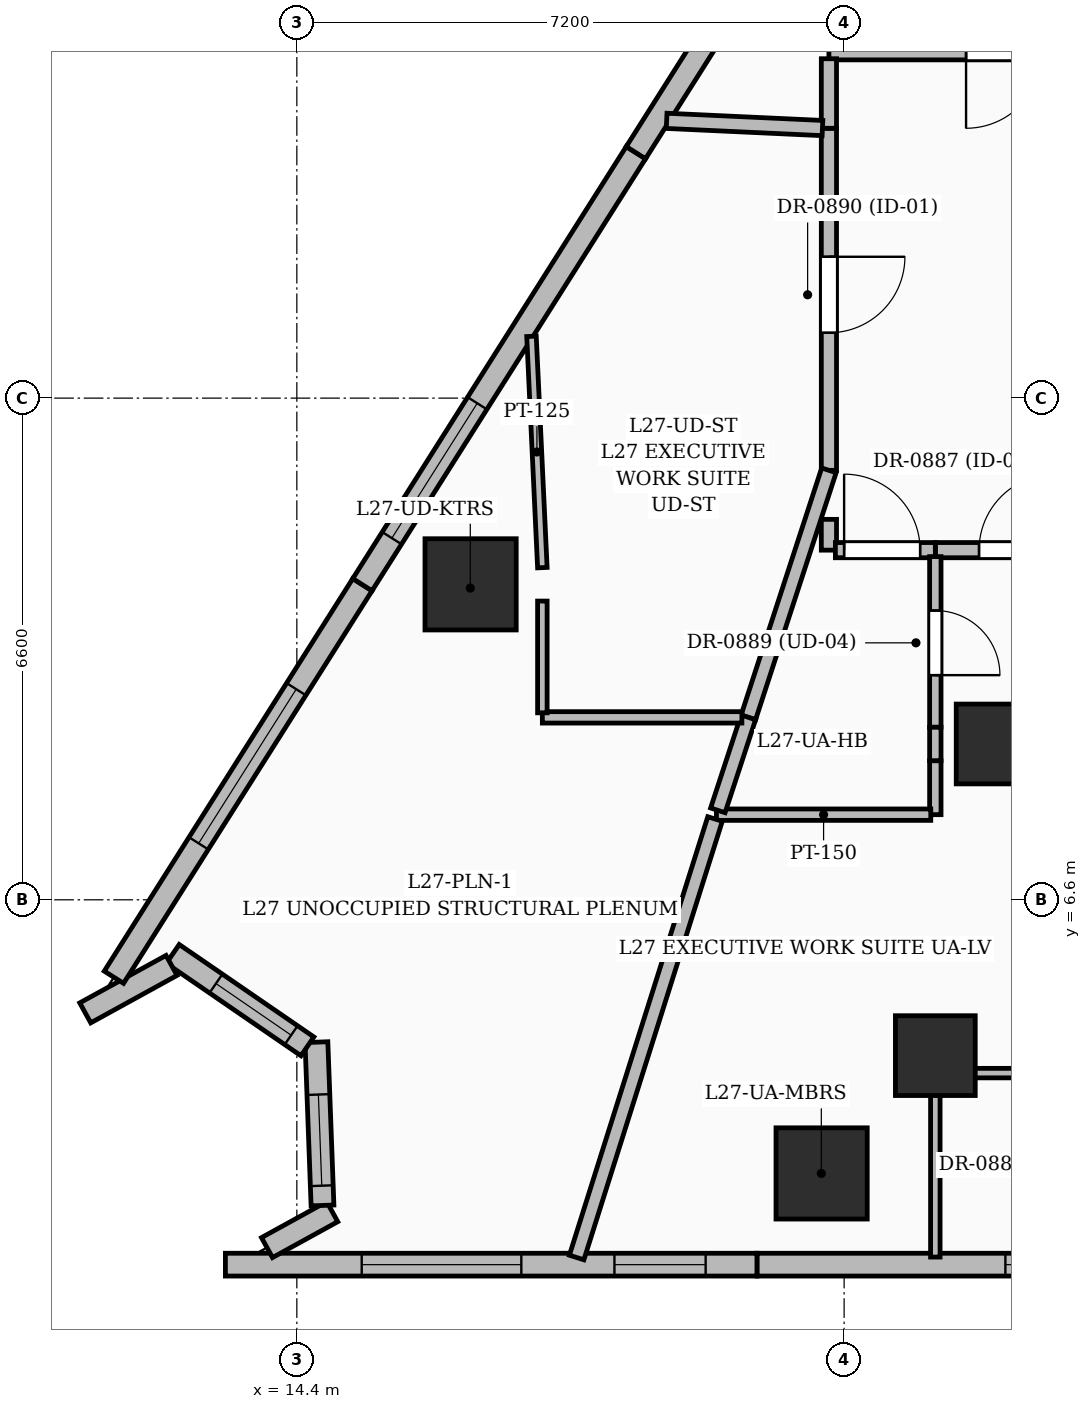
"""IFC4 building model, lengths in metres.
Left out: names, types, materials, properties, quantities, classifications, styles, units other than length and angle.
Written with IfcOpenShell. Run it as: python <this file> out.ifc"""

import sys

from ifc_helpers import new_model, si_unit, direction, frame, frame_2d, origin, origin_2d, place, context, subcontext, project, spatial, rectangle, extrude, element, fill, save


model = new_model("IFC4")
c1 = context("Model", 3, precision=1e-05, world=origin(), true_north=direction((0.0, 1.0)))
c2 = subcontext(c1, "Body", "Model", "MODEL_VIEW")
j1 = project(units=[si_unit("LENGTHUNIT", "METRE"), si_unit("PLANEANGLEUNIT", "RADIAN")], contexts=[c1])
p1 = place(None, origin())
s1 = spatial("IfcSite", under=j1, at=p1, CompositionType="ELEMENT")
p2 = place(p1, origin())
s2 = spatial("IfcBuilding", under=s1, at=p2, CompositionType="ELEMENT")
p3 = place(p2, frame((0.0, 0.0, 110.4)))
s3 = spatial("IfcBuildingStorey", under=s2, at=p3, CompositionType="ELEMENT", Elevation=110.4)
for number, where, z_axis, x_axis in (
    (1, (22.8, 4.55, 0.0), (0.0, 0.0, 1.0), (1.0, 0.0, 0.0)),
    (2, (23.6, 8.65, 0.0), (0.0, 0.0, 1.0), (1.0, 0.0, 0.0)),
):
    element("IfcColumn", number, at=place(p3, frame(where, z_axis=z_axis, x_axis=x_axis)), inside=s3, PredefinedType="COLUMN", context=c2, shape_type="SweptSolid", body=[
        extrude(rectangle(XDim=1.05, YDim=1.05, at=origin_2d()), origin(), (0.0, 0.0, 1.0), 3.6),
    ])
for number, where, z_axis, x_axis in (
    (3, (21.304, 3.0, 0.0), (0.0, 0.0, 1.0), (1.0, 0.0, 0.0)),
    (4, (16.686, 10.75, 0.0), (0.0, 0.0, 1.0), (1.0, 0.0, 0.0)),
):
    element("IfcColumn", number, at=place(p3, frame(where, z_axis=z_axis, x_axis=x_axis)), inside=s3, PredefinedType="COLUMN", context=c2, shape_type="SweptSolid", body=[
        extrude(rectangle(XDim=1.2, YDim=1.2, at=origin_2d()), origin(), (0.0, 0.0, 1.0), 3.6),
    ])
p4 = place(p3, frame((27.447, 1.8, 0.0), z_axis=(0.0, 0.0, 1.0), x_axis=(-1.0, 0.0, 0.0)))
e5 = element("IfcWall", 5, at=p4, inside=s3, PredefinedType="SOLIDWALL", context=c2, shape_type="SweptSolid", body=[
    extrude(rectangle(XDim=6.993, YDim=0.3, at=frame_2d((3.497, 0.0))), origin(), (0.0, 0.0, 1.0), 3.35),
])
p5 = place(p4, frame((1.325, 0.0, 0.6)))
e6 = element("IfcOpeningElement", 6, at=p5, cuts=e5, PredefinedType="OPENING", context=c2, shape_type="SweptSolid", body=[
    extrude(rectangle(XDim=2.4, YDim=2.1, at=frame_2d((1.2, 1.05))), frame((0.0, 0.16, 0.0), z_axis=(0.0, -1.0, 0.0), x_axis=(1.0, 0.0, 0.0)), (0.0, 0.0, 1.0), 0.32),
])
p6 = place(p3, frame((20.453, 1.8, 0.0), z_axis=(0.0, 0.0, 1.0), x_axis=(-1.0, 0.0, 0.0)))
e7 = element("IfcWall", 7, at=p6, inside=s3, PredefinedType="SOLIDWALL", context=c2, shape_type="SweptSolid", body=[
    extrude(rectangle(XDim=6.993, YDim=0.3, at=frame_2d((3.497, 0.0))), origin(), (0.0, 0.0, 1.0), 3.35),
])
p7 = place(p6, frame((0.675, 0.0, 0.8)))
e8 = element("IfcOpeningElement", 8, at=p7, cuts=e7, PredefinedType="OPENING", context=c2, shape_type="SweptSolid", body=[
    extrude(rectangle(XDim=1.2, YDim=1.8, at=frame_2d((0.6, 0.9))), frame((0.0, 0.16, 0.0), z_axis=(0.0, -1.0, 0.0), x_axis=(1.0, 0.0, 0.0)), (0.0, 0.0, 1.0), 0.32),
])
p8 = place(p6, frame((3.1, 0.0, 0.55)))
e9 = element("IfcOpeningElement", 9, at=p8, cuts=e7, PredefinedType="OPENING", context=c2, shape_type="SweptSolid", body=[
    extrude(rectangle(XDim=2.1, YDim=2.4, at=frame_2d((1.05, 1.2))), frame((0.0, 0.16, 0.0), z_axis=(0.0, -1.0, 0.0), x_axis=(1.0, 0.0, 0.0)), (0.0, 0.0, 1.0), 0.32),
])
p9 = place(p3, frame((14.007, 2.024, 0.0), z_axis=(0.0, 0.0, 1.0), x_axis=(0.876089618579, 0.482148296914, 0.0)))
e10 = element("IfcWall", 10, at=p9, inside=s3, PredefinedType="SOLIDWALL", context=c2, shape_type="SweptSolid", body=[
    extrude(rectangle(XDim=0.98, YDim=0.3, at=frame_2d((0.49, 0.0))), origin(), (0.0, 0.0, 1.0), 3.35),
])
p10 = place(p3, frame((14.738, 2.579, 0.0), z_axis=(0.0, 0.0, 1.0), x_axis=(-0.037141892545, 0.99931000186, 0.0)))
e11 = element("IfcWall", 11, at=p10, inside=s3, PredefinedType="SOLIDWALL", context=c2, shape_type="SweptSolid", body=[
    extrude(rectangle(XDim=2.149, YDim=0.3, at=frame_2d((1.075, 0.0))), origin(), (0.0, 0.0, 1.0), 3.35),
])
p11 = place(p10, frame((0.26, 0.0, 0.8)))
e12 = element("IfcOpeningElement", 12, at=p11, cuts=e11, PredefinedType="OPENING", context=c2, shape_type="SweptSolid", body=[
    extrude(rectangle(XDim=1.2, YDim=1.8, at=frame_2d((0.6, 0.9))), frame((0.0, 0.16, 0.0), z_axis=(0.0, -1.0, 0.0), x_axis=(1.0, 0.0, 0.0)), (0.0, 0.0, 1.0), 0.32),
])
p12 = place(p3, frame((14.539, 4.672, 0.0), z_axis=(0.0, 0.0, 1.0), x_axis=(-0.824422928204, 0.565974235678, 0.0)))
e13 = element("IfcWall", 13, at=p12, inside=s3, PredefinedType="SOLIDWALL", context=c2, shape_type="SweptSolid", body=[
    extrude(rectangle(XDim=2.149, YDim=0.3, at=frame_2d((1.075, 0.0))), origin(), (0.0, 0.0, 1.0), 3.35),
])
p13 = place(p12, frame((0.26, 0.0, 0.8)))
e14 = element("IfcOpeningElement", 14, at=p13, cuts=e13, PredefinedType="OPENING", context=c2, shape_type="SweptSolid", body=[
    extrude(rectangle(XDim=1.2, YDim=1.8, at=frame_2d((0.6, 0.9))), frame((0.0, 0.16, 0.0), z_axis=(0.0, -1.0, 0.0), x_axis=(1.0, 0.0, 0.0)), (0.0, 0.0, 1.0), 0.32),
])
p14 = place(p3, frame((12.752, 5.737, 0.0), z_axis=(0.0, 0.0, 1.0), x_axis=(-0.876299432815, -0.481766856527, 0.0)))
e15 = element("IfcWall", 15, at=p14, inside=s3, PredefinedType="SOLIDWALL", context=c2, shape_type="SweptSolid", body=[
    extrude(rectangle(XDim=1.296, YDim=0.3, at=frame_2d((0.648, 0.0))), origin(), (0.0, 0.0, 1.0), 3.35),
])
p15 = place(p3, frame((11.993, 5.581, 0.0), z_axis=(0.0, 0.0, 1.0), x_axis=(0.534883870605, 0.844925585461, 0.0)))
e16 = element("IfcWall", 16, at=p15, inside=s3, PredefinedType="SOLIDWALL", context=c2, shape_type="SweptSolid", body=[
    extrude(rectangle(XDim=6.112, YDim=0.3, at=frame_2d((3.056, 0.0))), origin(), (0.0, 0.0, 1.0), 3.35),
])
p16 = place(p15, frame((2.085, 0.0, 0.6)))
e17 = element("IfcOpeningElement", 17, at=p16, cuts=e16, PredefinedType="OPENING", context=c2, shape_type="SweptSolid", body=[
    extrude(rectangle(XDim=2.4, YDim=2.1, at=frame_2d((1.2, 1.05))), frame((0.0, 0.16, 0.0), z_axis=(0.0, -1.0, 0.0), x_axis=(1.0, 0.0, 0.0)), (0.0, 0.0, 1.0), 0.32),
])
p17 = place(p3, frame((15.262, 10.746, 0.0), z_axis=(0.0, 0.0, 1.0), x_axis=(0.534880248718, 0.844927878302, 0.0)))
e18 = element("IfcWall", 18, at=p17, inside=s3, PredefinedType="SOLIDWALL", context=c2, shape_type="SweptSolid", body=[
    extrude(rectangle(XDim=6.727, YDim=0.3, at=frame_2d((3.364, 0.0))), origin(), (0.0, 0.0, 1.0), 3.35),
])
p18 = place(p17, frame((0.725, 0.0, 0.55)))
e19 = element("IfcOpeningElement", 19, at=p18, cuts=e18, PredefinedType="OPENING", context=c2, shape_type="SweptSolid", body=[
    extrude(rectangle(XDim=2.1, YDim=2.4, at=frame_2d((1.05, 1.2))), frame((0.0, 0.16, 0.0), z_axis=(0.0, -1.0, 0.0), x_axis=(1.0, 0.0, 0.0)), (0.0, 0.0, 1.0), 0.32),
])
p19 = place(p3, frame((18.861, 16.429, 0.0), z_axis=(0.0, 0.0, 1.0), x_axis=(0.534891708764, 0.844920623429, 0.0)))
e20 = element("IfcWall", 20, at=p19, inside=s3, PredefinedType="SOLIDWALL", context=c2, shape_type="SweptSolid", body=[
    extrude(rectangle(XDim=6.447, YDim=0.3, at=frame_2d((3.224, 0.0))), origin(), (0.0, 0.0, 1.0), 3.35),
])
p20 = place(p19, frame((2.625, 0.0, 0.6)))
e21 = element("IfcOpeningElement", 21, at=p20, cuts=e20, PredefinedType="OPENING", context=c2, shape_type="SweptSolid", body=[
    extrude(rectangle(XDim=1.8, YDim=2.1, at=frame_2d((0.9, 1.05))), frame((0.0, 0.16, 0.0), z_axis=(0.0, -1.0, 0.0), x_axis=(1.0, 0.0, 0.0)), (0.0, 0.0, 1.0), 0.32),
])
p21 = place(p3, frame((22.8, 11.2, 0.0), z_axis=(0.0, 0.0, 1.0), x_axis=(1.0, 0.0, 0.0)))
e22 = element("IfcWall", 22, at=p21, inside=s3, PredefinedType="PARTITIONING", context=c2, shape_type="SweptSolid", body=[
    extrude(rectangle(XDim=2.069, YDim=0.2, at=frame_2d((1.035, 0.0))), origin(), (0.0, 0.0, 1.0), 3.35),
])
p22 = place(p21, frame((0.575, 0.0, 0.0)))
e23 = element("IfcOpeningElement", 23, at=p22, cuts=e22, PredefinedType="OPENING", context=c2, shape_type="SweptSolid", body=[
    extrude(rectangle(XDim=1.0, YDim=2.2, at=frame_2d((0.5, 1.1))), frame((0.0, 0.11, 0.0), z_axis=(0.0, -1.0, 0.0), x_axis=(1.0, 0.0, 0.0)), (0.0, 0.0, 1.0), 0.22),
])
p23 = place(p3, frame((21.4, 11.605, 0.0), z_axis=(0.0, 0.0, 1.0), x_axis=(0.0, -1.0, 0.0)))
e24 = element("IfcWall", 24, at=p23, inside=s3, PredefinedType="PARTITIONING", context=c2, shape_type="SweptSolid", body=[
    extrude(rectangle(XDim=0.405, YDim=0.2, at=frame_2d((0.203, 0.0))), origin(), (0.0, 0.0, 1.0), 2.709),
])
p24 = place(p3, frame((21.485, 11.2, 0.0), z_axis=(0.0, 0.0, 1.0), x_axis=(1.0, 0.0, 0.0)))
e25 = element("IfcWall", 25, at=p24, inside=s3, PredefinedType="PARTITIONING", context=c2, shape_type="SweptSolid", body=[
    extrude(rectangle(XDim=1.315, YDim=0.2, at=frame_2d((0.657, 0.0))), origin(), (0.0, 0.0, 1.0), 2.709),
])
p25 = place(p24, frame((0.115, 0.0, 0.0)))
e26 = element("IfcOpeningElement", 26, at=p25, cuts=e25, PredefinedType="OPENING", context=c2, shape_type="SweptSolid", body=[
    extrude(rectangle(XDim=1.0, YDim=2.2, at=frame_2d((0.5, 1.1))), frame((0.0, 0.11, 0.0), z_axis=(0.0, -1.0, 0.0), x_axis=(1.0, 0.0, 0.0)), (0.0, 0.0, 1.0), 0.22),
])
p26 = place(p3, frame((21.4, 16.75, 0.0), z_axis=(0.0, 0.0, 1.0), x_axis=(0.0, -1.0, 0.0)))
e27 = element("IfcWall", 27, at=p26, inside=s3, PredefinedType="PARTITIONING", context=c2, shape_type="SweptSolid", body=[
    extrude(rectangle(XDim=4.5, YDim=0.2, at=frame_2d((2.25, 0.0))), origin(), (0.0, 0.0, 1.0), 2.709),
])
p27 = place(p26, frame((1.69, 0.0, 0.0)))
e28 = element("IfcOpeningElement", 28, at=p27, cuts=e27, PredefinedType="OPENING", context=c2, shape_type="SweptSolid", body=[
    extrude(rectangle(XDim=1.0, YDim=2.2, at=frame_2d((0.5, 1.1))), frame((0.0, 0.11, 0.0), z_axis=(0.0, -1.0, 0.0), x_axis=(1.0, 0.0, 0.0)), (0.0, 0.0, 1.0), 0.22),
])
p28 = place(p3, frame((25.89, 17.75, 0.0), z_axis=(0.0, 0.0, 1.0), x_axis=(-1.0, 0.0, 0.0)))
e29 = element("IfcWall", 29, at=p28, inside=s3, PredefinedType="PARTITIONING", context=c2, shape_type="SweptSolid", body=[
    extrude(rectangle(XDim=4.49, YDim=0.2, at=frame_2d((2.245, 0.0))), origin(), (0.0, 0.0, 1.0), 2.372),
])
p29 = place(p28, frame((1.686, 0.0, 0.0)))
e30 = element("IfcOpeningElement", 30, at=p29, cuts=e29, PredefinedType="OPENING", context=c2, shape_type="SweptSolid", body=[
    extrude(rectangle(XDim=1.0, YDim=2.2, at=frame_2d((0.5, 1.1))), frame((0.0, 0.11, 0.0), z_axis=(0.0, -1.0, 0.0), x_axis=(1.0, 0.0, 0.0)), (0.0, 0.0, 1.0), 0.22),
])
p30 = place(p3, frame((21.4, 17.665, 0.0), z_axis=(0.0, 0.0, 1.0), x_axis=(0.0, -1.0, 0.0)))
e31 = element("IfcWall", 31, at=p30, inside=s3, PredefinedType="PARTITIONING", context=c2, shape_type="SweptSolid", body=[
    extrude(rectangle(XDim=0.915, YDim=0.2, at=frame_2d((0.458, 0.0))), origin(), (0.0, 0.0, 1.0), 2.57),
])
p31 = place(p3, frame((22.8, 8.43, 0.0), z_axis=(0.0, 0.0, 1.0), x_axis=(0.0, -1.0, 0.0)))
e32 = element("IfcWall", 32, at=p31, inside=s3, PredefinedType="PARTITIONING", context=c2, shape_type="SweptSolid", body=[
    extrude(rectangle(XDim=0.71, YDim=0.15, at=frame_2d((0.355, 0.0))), origin(), (0.0, 0.0, 1.0), 3.35),
])
p32 = place(p3, frame((22.8, 11.115, 0.0), z_axis=(0.0, 0.0, 1.0), x_axis=(0.0, -1.0, 0.0)))
e33 = element("IfcWall", 33, at=p32, inside=s3, PredefinedType="PARTITIONING", context=c2, shape_type="SweptSolid", body=[
    extrude(rectangle(XDim=2.245, YDim=0.15, at=frame_2d((1.123, 0.0))), origin(), (0.0, 0.0, 1.0), 2.372),
])
p33 = place(p32, frame((0.709, 0.0, 0.0)))
e34 = element("IfcOpeningElement", 34, at=p33, cuts=e33, PredefinedType="OPENING", context=c2, shape_type="SweptSolid", body=[
    extrude(rectangle(XDim=0.85, YDim=2.1, at=frame_2d((0.425, 1.05))), frame((0.0, 0.085, 0.0), z_axis=(0.0, -1.0, 0.0), x_axis=(1.0, 0.0, 0.0)), (0.0, 0.0, 1.0), 0.17),
])
p34 = place(p3, frame((22.8, 4.32, 0.0), z_axis=(0.0, 0.0, 1.0), x_axis=(1.0, 0.0, 0.0)))
e35 = element("IfcWall", 35, at=p34, inside=s3, PredefinedType="PARTITIONING", context=c2, shape_type="SweptSolid", body=[
    extrude(rectangle(XDim=4.375, YDim=0.125, at=frame_2d((2.188, 0.0))), origin(), (0.0, 0.0, 1.0), 2.436),
])
p35 = place(p34, frame((1.654, 0.0, 0.0)))
e36 = element("IfcOpeningElement", 36, at=p35, cuts=e35, PredefinedType="OPENING", context=c2, shape_type="SweptSolid", body=[
    extrude(rectangle(XDim=0.95, YDim=2.2, at=frame_2d((0.475, 1.1))), frame((0.0, 0.072, 0.0), z_axis=(0.0, -1.0, 0.0), x_axis=(1.0, 0.0, 0.0)), (0.0, 0.0, 1.0), 0.145),
])
p36 = place(p3, frame((19.92, 7.72, 0.0), z_axis=(0.0, 0.0, 1.0), x_axis=(1.0, 0.0, 0.0)))
e37 = element("IfcWall", 37, at=p36, inside=s3, PredefinedType="PARTITIONING", context=c2, shape_type="SweptSolid", body=[
    extrude(rectangle(XDim=2.82, YDim=0.15, at=frame_2d((1.41, 0.0))), origin(), (0.0, 0.0, 1.0), 3.35),
])
p37 = place(p3, frame((21.4, 12.25, 0.0), z_axis=(0.0, 0.0, 1.0), x_axis=(-0.310029019977, -0.950727093741, 0.0)))
e38 = element("IfcWall", 38, at=p37, inside=s3, PredefinedType="PARTITIONING", context=c2, shape_type="SweptSolid", body=[
    extrude(rectangle(XDim=3.418, YDim=0.2, at=frame_2d((1.709, 0.0))), origin(), (0.0, 0.0, 1.0), 2.372),
])
p38 = place(p3, frame((20.34, 9.0, 0.0), z_axis=(0.0, 0.0, 1.0), x_axis=(-0.311842662142, -0.950133755883, 0.0)))
e39 = element("IfcWall", 39, at=p38, inside=s3, PredefinedType="PARTITIONING", context=c2, shape_type="SweptSolid", body=[
    extrude(rectangle(XDim=1.287, YDim=0.2, at=frame_2d((0.644, 0.0))), origin(), (0.0, 0.0, 1.0), 3.35),
])
p39 = place(p3, frame((22.8, 4.272, 0.0), z_axis=(0.0, 0.0, 1.0), x_axis=(0.0, -1.0, 0.0)))
e40 = element("IfcWall", 40, at=p39, inside=s3, PredefinedType="PARTITIONING", context=c2, shape_type="SweptSolid", body=[
    extrude(rectangle(XDim=2.373, YDim=0.125, at=frame_2d((1.186, 0.0))), origin(), (0.0, 0.0, 1.0), 2.57),
])
p40 = place(p3, frame((19.902, 7.663, 0.0), z_axis=(0.0, 0.0, 1.0), x_axis=(-0.300992296292, -0.953626571344, 0.0)))
e41 = element("IfcWall", 41, at=p40, inside=s3, PredefinedType="PARTITIONING", context=c2, shape_type="SweptSolid", body=[
    extrude(rectangle(XDim=6.049, YDim=0.2, at=frame_2d((3.025, 0.0))), origin(), (0.0, 0.0, 1.0), 2.57),
])
p41 = place(p3, frame((17.63, 9.0, 0.0), z_axis=(0.0, 0.0, 1.0), x_axis=(1.0, 0.0, 0.0)))
e42 = element("IfcWall", 42, at=p41, inside=s3, PredefinedType="PARTITIONING", context=c2, shape_type="SweptSolid", body=[
    extrude(rectangle(XDim=2.625, YDim=0.15, at=frame_2d((1.312, 0.0))), origin(), (0.0, 0.0, 1.0), 2.57),
])
p42 = place(p3, frame((17.63, 10.53, 0.0), z_axis=(0.0, 0.0, 1.0), x_axis=(0.0, -1.0, 0.0)))
e43 = element("IfcWall", 43, at=p42, inside=s3, PredefinedType="PARTITIONING", context=c2, shape_type="SweptSolid", body=[
    extrude(rectangle(XDim=1.47, YDim=0.125, at=frame_2d((0.735, 0.0))), origin(), (0.0, 0.0, 1.0), 2.372),
])
p43 = place(p3, frame((17.487, 14.013, 0.0), z_axis=(0.0, 0.0, 1.0), x_axis=(0.046883561563, -0.998900361225, 0.0)))
e44 = element("IfcWall", 44, at=p43, inside=s3, PredefinedType="PARTITIONING", context=c2, shape_type="SweptSolid", body=[
    extrude(rectangle(XDim=3.046, YDim=0.125, at=frame_2d((1.523, 0.0))), origin(), (0.0, 0.0, 1.0), 2.57),
])
p44 = place(p3, frame((21.315, 16.753, 0.0), z_axis=(0.0, 0.0, 1.0), x_axis=(-0.998928926466, 0.046270939795, 0.0)))
e45 = element("IfcWall", 45, at=p44, inside=s3, PredefinedType="PARTITIONING", context=c2, shape_type="SweptSolid", body=[
    extrude(rectangle(XDim=2.052, YDim=0.2, at=frame_2d((1.026, 0.0))), origin(), (0.0, 0.0, 1.0), 2.57),
])
p45 = place(p3, frame((22.8, 8.43, 0.0), z_axis=(0.0, 0.0, 1.0), x_axis=(0.0, 1.0, 0.0)))
e46 = element("IfcWall", 46, at=p45, inside=s3, PredefinedType="PARTITIONING", context=c2, shape_type="SweptSolid", body=[
    extrude(rectangle(XDim=0.44, YDim=0.15, at=frame_2d((0.22, 0.0))), origin(), (0.0, 0.0, 1.0), 2.372),
])
p46 = place(p5, origin())
e47 = element("IfcWindow", 47, at=p46, inside=s3, PartitioningType="SINGLE_PANEL", PredefinedType="WINDOW", context=c2, shape_type="SweptSolid", body=[
    extrude(rectangle(XDim=2.4, YDim=2.1, at=frame_2d((1.2, 1.05))), frame((0.0, 0.03, 0.0), z_axis=(0.0, -1.0, 0.0), x_axis=(1.0, 0.0, 0.0)), (0.0, 0.0, 1.0), 0.06),
])
fill(e6, e47)
p47 = place(p7, origin())
e48 = element("IfcWindow", 48, at=p47, inside=s3, PartitioningType="SINGLE_PANEL", PredefinedType="WINDOW", context=c2, shape_type="SweptSolid", body=[
    extrude(rectangle(XDim=1.2, YDim=1.8, at=frame_2d((0.6, 0.9))), frame((0.0, 0.03, 0.0), z_axis=(0.0, -1.0, 0.0), x_axis=(1.0, 0.0, 0.0)), (0.0, 0.0, 1.0), 0.06),
])
fill(e8, e48)
p48 = place(p8, origin())
e49 = element("IfcWindow", 49, at=p48, inside=s3, PartitioningType="SINGLE_PANEL", PredefinedType="WINDOW", context=c2, shape_type="SweptSolid", body=[
    extrude(rectangle(XDim=2.1, YDim=2.4, at=frame_2d((1.05, 1.2))), frame((0.0, 0.03, 0.0), z_axis=(0.0, -1.0, 0.0), x_axis=(1.0, 0.0, 0.0)), (0.0, 0.0, 1.0), 0.06),
])
fill(e9, e49)
p49 = place(p11, origin())
e50 = element("IfcWindow", 50, at=p49, inside=s3, PartitioningType="SINGLE_PANEL", PredefinedType="WINDOW", context=c2, shape_type="SweptSolid", body=[
    extrude(rectangle(XDim=1.2, YDim=1.8, at=frame_2d((0.6, 0.9))), frame((0.0, 0.03, 0.0), z_axis=(0.0, -1.0, 0.0), x_axis=(1.0, 0.0, 0.0)), (0.0, 0.0, 1.0), 0.06),
])
fill(e12, e50)
p50 = place(p13, origin())
e51 = element("IfcWindow", 51, at=p50, inside=s3, PartitioningType="SINGLE_PANEL", PredefinedType="WINDOW", context=c2, shape_type="SweptSolid", body=[
    extrude(rectangle(XDim=1.2, YDim=1.8, at=frame_2d((0.6, 0.9))), frame((0.0, 0.03, 0.0), z_axis=(0.0, -1.0, 0.0), x_axis=(1.0, 0.0, 0.0)), (0.0, 0.0, 1.0), 0.06),
])
fill(e14, e51)
p51 = place(p16, origin())
e52 = element("IfcWindow", 52, at=p51, inside=s3, PartitioningType="SINGLE_PANEL", PredefinedType="WINDOW", context=c2, shape_type="SweptSolid", body=[
    extrude(rectangle(XDim=2.4, YDim=2.1, at=frame_2d((1.2, 1.05))), frame((0.0, 0.03, 0.0), z_axis=(0.0, -1.0, 0.0), x_axis=(1.0, 0.0, 0.0)), (0.0, 0.0, 1.0), 0.06),
])
fill(e17, e52)
p52 = place(p18, origin())
e53 = element("IfcWindow", 53, at=p52, inside=s3, PartitioningType="SINGLE_PANEL", PredefinedType="WINDOW", context=c2, shape_type="SweptSolid", body=[
    extrude(rectangle(XDim=2.1, YDim=2.4, at=frame_2d((1.05, 1.2))), frame((0.0, 0.03, 0.0), z_axis=(0.0, -1.0, 0.0), x_axis=(1.0, 0.0, 0.0)), (0.0, 0.0, 1.0), 0.06),
])
fill(e19, e53)
p53 = place(p22, origin())
e54 = element("IfcDoor", 54, at=p53, inside=s3, OperationType="SINGLE_SWING_RIGHT", PredefinedType="DOOR", context=c2, shape_type="SweptSolid", body=[
    extrude(rectangle(XDim=1.0, YDim=2.2, at=frame_2d((0.5, 1.1))), frame((0.0, 0.025, 0.0), z_axis=(0.0, -1.0, 0.0), x_axis=(1.0, 0.0, 0.0)), (0.0, 0.0, 1.0), 0.05),
])
fill(e23, e54)
p54 = place(p33, origin())
e55 = element("IfcDoor", 55, at=p54, inside=s3, OperationType="SINGLE_SWING_RIGHT", PredefinedType="DOOR", context=c2, shape_type="SweptSolid", body=[
    extrude(rectangle(XDim=0.85, YDim=2.1, at=frame_2d((0.425, 1.05))), frame((0.0, 0.025, 0.0), z_axis=(0.0, -1.0, 0.0), x_axis=(1.0, 0.0, 0.0)), (0.0, 0.0, 1.0), 0.05),
])
fill(e34, e55)
p55 = place(p27, origin())
e56 = element("IfcDoor", 56, at=p55, inside=s3, OperationType="SINGLE_SWING_LEFT", PredefinedType="DOOR", context=c2, shape_type="SweptSolid", body=[
    extrude(rectangle(XDim=1.0, YDim=2.2, at=frame_2d((0.5, 1.1))), frame((0.0, 0.025, 0.0), z_axis=(0.0, -1.0, 0.0), x_axis=(1.0, 0.0, 0.0)), (0.0, 0.0, 1.0), 0.05),
])
fill(e28, e56)
p56 = place(p29, origin())
e57 = element("IfcDoor", 57, at=p56, inside=s3, OperationType="SINGLE_SWING_RIGHT", PredefinedType="DOOR", context=c2, shape_type="SweptSolid", body=[
    extrude(rectangle(XDim=1.0, YDim=2.2, at=frame_2d((0.5, 1.1))), frame((0.0, 0.025, 0.0), z_axis=(0.0, -1.0, 0.0), x_axis=(1.0, 0.0, 0.0)), (0.0, 0.0, 1.0), 0.05),
])
fill(e30, e57)
p57 = place(p25, origin())
e58 = element("IfcDoor", 58, at=p57, inside=s3, OperationType="SINGLE_SWING_LEFT", PredefinedType="DOOR", context=c2, shape_type="SweptSolid", body=[
    extrude(rectangle(XDim=1.0, YDim=2.2, at=frame_2d((0.5, 1.1))), frame((0.0, 0.025, 0.0), z_axis=(0.0, -1.0, 0.0), x_axis=(1.0, 0.0, 0.0)), (0.0, 0.0, 1.0), 0.05),
])
fill(e26, e58)
save(model, sys.argv[1])
